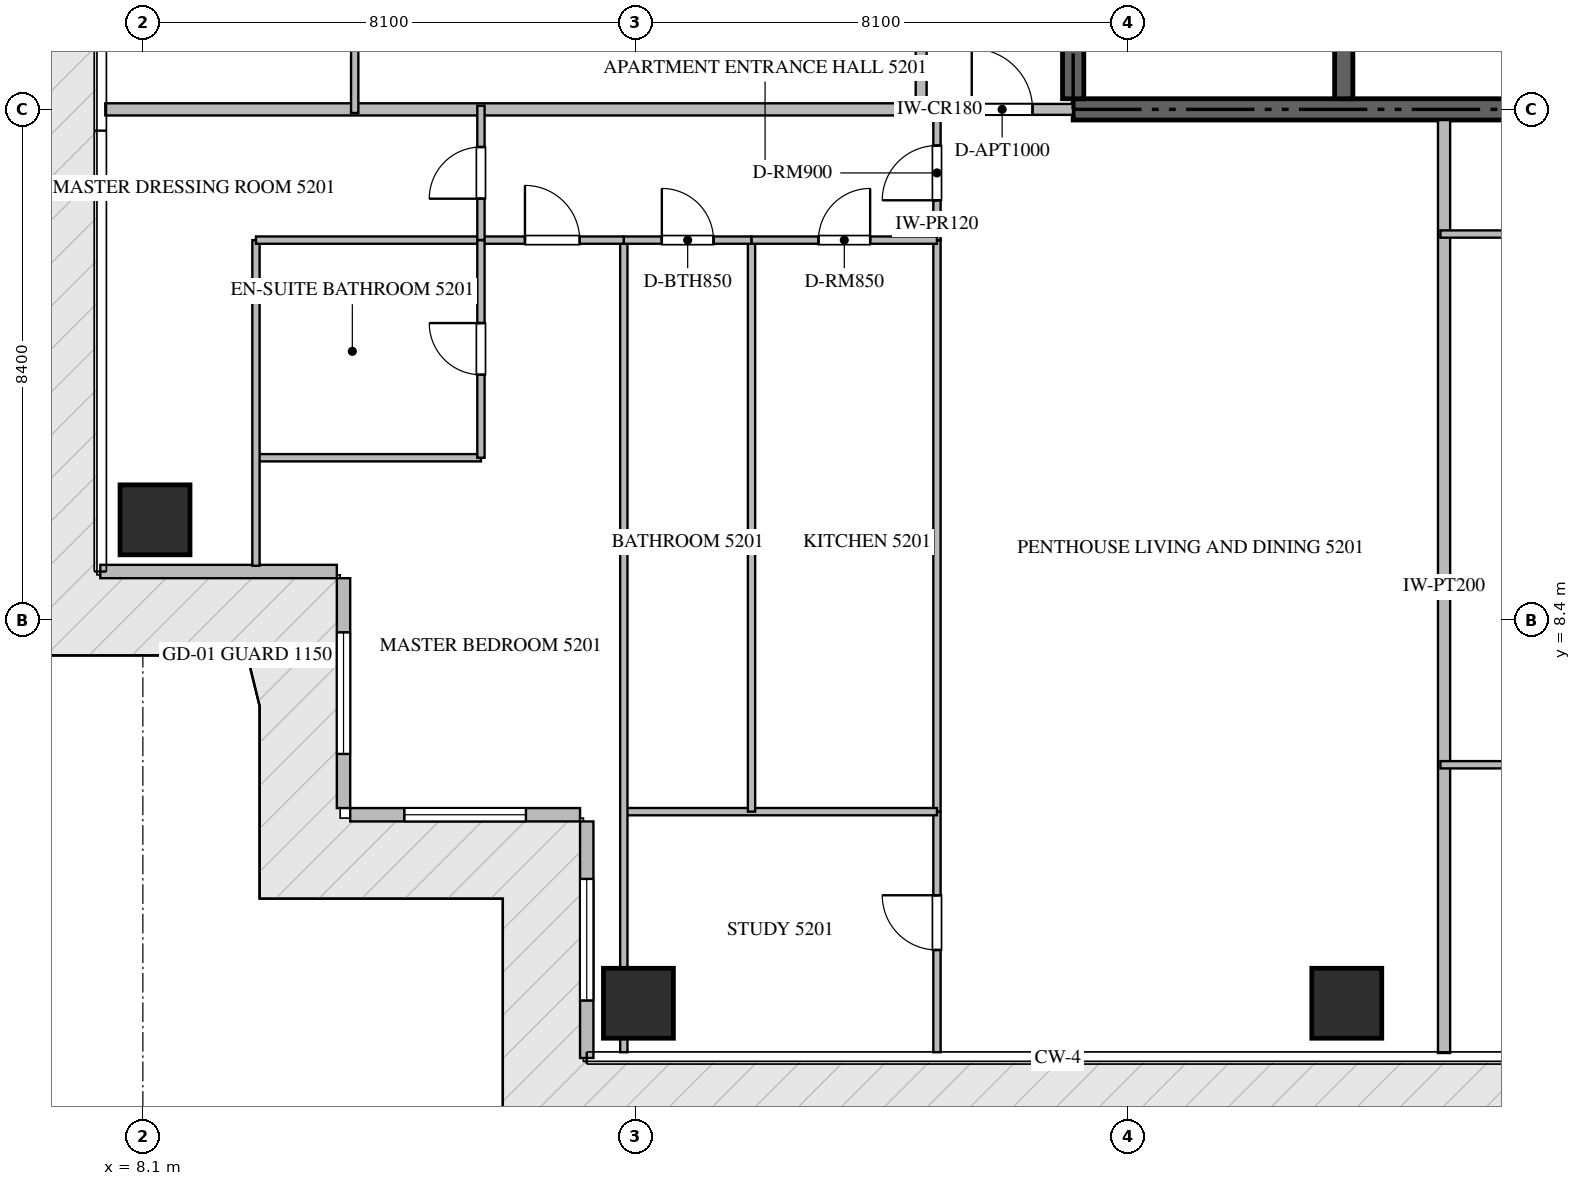
"""IFC4 building model, lengths in metres.
Left out: names, types, materials, properties, quantities, classifications, styles, units other than length and angle.
Written with IfcOpenShell. Run it as: python <this file> out.ifc"""

import sys

from ifc_helpers import new_model, si_unit, direction, frame, frame_2d, origin, origin_2d, place, context, subcontext, project, spatial, rectangle, extrude, source, transform, mapped, element, fill, save


model = new_model("IFC4")
c1 = context("Model", 3, precision=1e-05, world=origin(), true_north=direction((0.0, 1.0)))
c2 = subcontext(c1, "Body", "Model", "MODEL_VIEW")
j1 = project(units=[si_unit("LENGTHUNIT", "METRE"), si_unit("PLANEANGLEUNIT", "RADIAN")], contexts=[c1])
p1 = place(None, origin())
s1 = spatial("IfcSite", under=j1, at=p1, CompositionType="ELEMENT")
p2 = place(p1, origin())
s2 = spatial("IfcBuilding", under=s1, at=p2, CompositionType="ELEMENT")
p3 = place(p2, frame((0.0, 0.0, 210.45)))
s3 = spatial("IfcBuildingStorey", under=s2, at=p3, CompositionType="ELEMENT", Elevation=210.45)
p4 = place(p3, frame((23.4, 16.8, -0.44), z_axis=(0.0, 0.0, 1.0), x_axis=(1.0, 0.0, 0.0)))
e1 = element("IfcWall", 1, at=p4, inside=s3, PredefinedType="SHEAR", context=c2, shape_type="SweptSolid", body=[
    extrude(rectangle(XDim=18.0, YDim=0.35, at=frame_2d((9.0, 0.0))), origin(), (0.0, 0.0, 1.0), 4.028),
])
p5 = place(p3, frame((23.4, 16.975, -0.44), z_axis=(0.0, 0.0, 1.0), x_axis=(0.0, 1.0, 0.0)))
e2 = element("IfcWall", 2, at=p5, inside=s3, PredefinedType="SHEAR", context=c2, shape_type="SweptSolid", body=[
    extrude(rectangle(XDim=4.875, YDim=0.35, at=frame_2d((2.438, 0.0))), origin(), (0.0, 0.0, 1.0), 4.028),
])
p6 = place(p3, frame((27.85, 16.975, -0.44), z_axis=(0.0, 0.0, 1.0), x_axis=(0.0, 1.0, 0.0)))
e3 = element("IfcWall", 3, at=p6, inside=s3, PredefinedType="SHEAR", context=c2, shape_type="SweptSolid", body=[
    extrude(rectangle(XDim=4.875, YDim=0.3, at=frame_2d((2.438, 0.0))), origin(), (0.0, 0.0, 1.0), 4.028),
])
m1 = source(origin(), c2, "Body", "SweptSolid", [
    extrude(rectangle(XDim=1.15, YDim=1.15, at=origin_2d()), origin(), (0.0, 0.0, 1.0), 4.03),
])
for number, where, z_axis, x_axis in (
    (4, (16.25, 2.1, -0.44), (0.0, 0.0, 1.0), (1.0, 0.0, 0.0)),
    (5, (27.9, 2.1, -0.44), (0.0, 0.0, 1.0), (1.0, 0.0, 0.0)),
    (6, (8.3, 10.05, -0.44), (0.0, 0.0, 1.0), (1.0, 0.0, 0.0)),
):
    element("IfcColumn", number, at=place(p3, frame(where, z_axis=z_axis, x_axis=x_axis)), inside=s3, PredefinedType="COLUMN", context=c2, shape_type="MappedRepresentation", body=[
        mapped(m1, transform((0.0, 0.0, 0.0), scale=1.0)),
    ])
p7 = place(p3, frame((7.4, 9.2, 0.0), z_axis=(0.0, 0.0, 1.0), x_axis=(1.0, 0.0, 0.0)))
e7 = element("IfcWall", 7, at=p7, inside=s3, PredefinedType="ELEMENTEDWALL", context=c2, shape_type="SweptSolid", body=[
    extrude(rectangle(XDim=3.89, YDim=0.22, at=frame_2d((1.945, 0.0))), origin(), (0.0, 0.0, 1.0), 3.575),
])
p8 = place(p3, frame((11.4, 9.09, 0.0), z_axis=(0.0, 0.0, 1.0), x_axis=(0.0, -1.0, 0.0)))
e8 = element("IfcWall", 8, at=p8, inside=s3, PredefinedType="ELEMENTEDWALL", context=c2, shape_type="SweptSolid", body=[
    extrude(rectangle(XDim=3.78, YDim=0.22, at=frame_2d((1.89, 0.0))), origin(), (0.0, 0.0, 1.0), 3.575),
])
p9 = place(p8, frame((0.89, 0.0, 0.65)))
e9 = element("IfcOpeningElement", 9, at=p9, cuts=e8, PredefinedType="OPENING", context=c2, shape_type="SweptSolid", body=[
    extrude(rectangle(XDim=2.0, YDim=2.2, at=frame_2d((1.0, 1.1))), frame((0.0, 0.12, 0.0), z_axis=(0.0, -1.0, 0.0), x_axis=(1.0, 0.0, 0.0)), (0.0, 0.0, 1.0), 0.24),
])
p10 = place(p3, frame((11.51, 5.2, 0.0), z_axis=(0.0, 0.0, 1.0), x_axis=(1.0, 0.0, 0.0)))
e10 = element("IfcWall", 10, at=p10, inside=s3, PredefinedType="ELEMENTEDWALL", context=c2, shape_type="SweptSolid", body=[
    extrude(rectangle(XDim=3.78, YDim=0.22, at=frame_2d((1.89, 0.0))), origin(), (0.0, 0.0, 1.0), 3.575),
])
p11 = place(p10, frame((0.89, 0.0, 0.65)))
e11 = element("IfcOpeningElement", 11, at=p11, cuts=e10, PredefinedType="OPENING", context=c2, shape_type="SweptSolid", body=[
    extrude(rectangle(XDim=2.0, YDim=2.2, at=frame_2d((1.0, 1.1))), frame((0.0, 0.12, 0.0), z_axis=(0.0, -1.0, 0.0), x_axis=(1.0, 0.0, 0.0)), (0.0, 0.0, 1.0), 0.24),
])
p12 = place(p3, frame((15.4, 5.09, 0.0), z_axis=(0.0, 0.0, 1.0), x_axis=(0.0, -1.0, 0.0)))
e12 = element("IfcWall", 12, at=p12, inside=s3, PredefinedType="ELEMENTEDWALL", context=c2, shape_type="SweptSolid", body=[
    extrude(rectangle(XDim=3.89, YDim=0.22, at=frame_2d((1.945, 0.0))), origin(), (0.0, 0.0, 1.0), 3.575),
])
p13 = place(p12, frame((0.945, 0.0, 0.65)))
e13 = element("IfcOpeningElement", 13, at=p13, cuts=e12, PredefinedType="OPENING", context=c2, shape_type="SweptSolid", body=[
    extrude(rectangle(XDim=2.0, YDim=2.2, at=frame_2d((1.0, 1.1))), frame((0.0, 0.12, 0.0), z_axis=(0.0, -1.0, 0.0), x_axis=(1.0, 0.0, 0.0)), (0.0, 0.0, 1.0), 0.24),
])
p14 = place(p3, frame((29.5, 1.282, 0.0), z_axis=(0.0, 0.0, 1.0), x_axis=(0.0, 1.0, 0.0)))
e14 = element("IfcWall", 14, at=p14, inside=s3, PredefinedType="PARTITIONING", context=c2, shape_type="SweptSolid", body=[
    extrude(rectangle(XDim=15.343, YDim=0.2, at=frame_2d((7.671, 0.0))), origin(), (0.0, 0.0, 1.0), 3.59),
])
p15 = place(p3, frame((7.482, 16.8, 0.0), z_axis=(0.0, 0.0, 1.0), x_axis=(1.0, 0.0, 0.0)))
e15 = element("IfcWall", 15, at=p15, inside=s3, PredefinedType="PARTITIONING", context=c2, shape_type="SweptSolid", body=[
    extrude(rectangle(XDim=13.418, YDim=0.2, at=frame_2d((6.709, 0.0))), origin(), (0.0, 0.0, 1.0), 3.59),
])
p16 = place(p3, frame((20.902, 16.8, 0.0), z_axis=(0.0, 0.0, 1.0), x_axis=(1.0, 0.0, 0.0)))
e16 = element("IfcWall", 16, at=p16, inside=s3, PredefinedType="PARTITIONING", context=c2, shape_type="SweptSolid", body=[
    extrude(rectangle(XDim=2.496, YDim=0.18, at=frame_2d((1.248, 0.0))), origin(), (0.0, 0.0, 1.0), 3.59),
])
p17 = place(p16, frame((0.83, 0.0, 0.0)))
e17 = element("IfcOpeningElement", 17, at=p17, cuts=e16, PredefinedType="OPENING", context=c2, shape_type="SweptSolid", body=[
    extrude(rectangle(XDim=1.0, YDim=2.15, at=frame_2d((0.5, 1.075))), frame((0.0, 0.1, 0.0), z_axis=(0.0, -1.0, 0.0), x_axis=(1.0, 0.0, 0.0)), (0.0, 0.0, 1.0), 0.2),
])
p18 = place(p3, frame((20.9, 16.8, 0.0), z_axis=(0.0, 0.0, 1.0), x_axis=(0.0, 1.0, 0.0)))
e18 = element("IfcWall", 18, at=p18, inside=s3, PredefinedType="PARTITIONING", context=c2, shape_type="SweptSolid", body=[
    extrude(rectangle(XDim=16.8, YDim=0.18, at=frame_2d((8.4, 0.0))), origin(), (0.0, 0.0, 1.0), 3.59),
])
p19 = place(p18, frame((14.5, 0.0, 0.0)))
e19 = element("IfcOpeningElement", 19, at=p19, cuts=e18, PredefinedType="OPENING", context=c2, shape_type="SweptSolid", body=[
    extrude(rectangle(XDim=1.0, YDim=2.15, at=frame_2d((0.5, 1.075))), frame((0.0, 0.1, 0.0), z_axis=(0.0, -1.0, 0.0), x_axis=(1.0, 0.0, 0.0)), (0.0, 0.0, 1.0), 0.2),
])
p20 = place(p3, frame((21.16, 14.65, 0.0), z_axis=(0.0, 0.0, 1.0), x_axis=(0.0, 1.0, 0.0)))
e20 = element("IfcWall", 20, at=p20, inside=s3, PredefinedType="PARTITIONING", context=c2, shape_type="SweptSolid", body=[
    extrude(rectangle(XDim=2.21, YDim=0.12, at=frame_2d((1.105, 0.0))), origin(), (0.0, 0.0, 1.0), 3.59),
])
p21 = place(p20, frame((0.655, 0.0, 0.0)))
e21 = element("IfcOpeningElement", 21, at=p21, cuts=e20, PredefinedType="OPENING", context=c2, shape_type="SweptSolid", body=[
    extrude(rectangle(XDim=0.9, YDim=2.1, at=frame_2d((0.45, 1.05))), frame((0.0, 0.07, 0.0), z_axis=(0.0, -1.0, 0.0), x_axis=(1.0, 0.0, 0.0)), (0.0, 0.0, 1.0), 0.14),
])
p22 = place(p3, frame((21.16, 1.295, 0.0), z_axis=(0.0, 0.0, 1.0), x_axis=(0.0, 1.0, 0.0)))
e22 = element("IfcWall", 22, at=p22, inside=s3, PredefinedType="PARTITIONING", context=c2, shape_type="SweptSolid", body=[
    extrude(rectangle(XDim=3.956, YDim=0.12, at=frame_2d((1.978, 0.0))), origin(), (0.0, 0.0, 1.0), 3.59),
])
p23 = place(p22, frame((1.681, 0.0, 0.0)))
e23 = element("IfcOpeningElement", 23, at=p23, cuts=e22, PredefinedType="OPENING", context=c2, shape_type="SweptSolid", body=[
    extrude(rectangle(XDim=0.9, YDim=2.1, at=frame_2d((0.45, 1.05))), frame((0.0, 0.07, 0.0), z_axis=(0.0, -1.0, 0.0), x_axis=(1.0, 0.0, 0.0)), (0.0, 0.0, 1.0), 0.14),
])
p24 = place(p3, frame((21.16, 5.253, 0.0), z_axis=(0.0, 0.0, 1.0), x_axis=(0.0, 1.0, 0.0)))
e24 = element("IfcWall", 24, at=p24, inside=s3, PredefinedType="PARTITIONING", context=c2, shape_type="SweptSolid", body=[
    extrude(rectangle(XDim=9.395, YDim=0.12, at=frame_2d((4.698, 0.0))), origin(), (0.0, 0.0, 1.0), 3.59),
])
p25 = place(p3, frame((16.01, 5.251, 0.0), z_axis=(0.0, 0.0, 1.0), x_axis=(1.0, 0.0, 0.0)))
e25 = element("IfcWall", 25, at=p25, inside=s3, PredefinedType="PARTITIONING", context=c2, shape_type="SweptSolid", body=[
    extrude(rectangle(XDim=5.15, YDim=0.12, at=frame_2d((2.575, 0.0))), origin(), (0.0, 0.0, 1.0), 3.59),
])
p26 = place(p3, frame((16.01, 1.295, 0.0), z_axis=(0.0, 0.0, 1.0), x_axis=(0.0, 1.0, 0.0)))
e26 = element("IfcWall", 26, at=p26, inside=s3, PredefinedType="PARTITIONING", context=c2, shape_type="SweptSolid", body=[
    extrude(rectangle(XDim=13.355, YDim=0.12, at=frame_2d((6.677, 0.0))), origin(), (0.0, 0.0, 1.0), 3.122),
])
p27 = place(p3, frame((18.11, 5.251, 0.0), z_axis=(0.0, 0.0, 1.0), x_axis=(0.0, 1.0, 0.0)))
e27 = element("IfcWall", 27, at=p27, inside=s3, PredefinedType="PARTITIONING", context=c2, shape_type="SweptSolid", body=[
    extrude(rectangle(XDim=9.399, YDim=0.12, at=frame_2d((4.699, 0.0))), origin(), (0.0, 0.0, 1.0), 3.59),
])
p28 = place(p3, frame((16.01, 14.65, 0.0), z_axis=(0.0, 0.0, 1.0), x_axis=(1.0, 0.0, 0.0)))
e28 = element("IfcWall", 28, at=p28, inside=s3, PredefinedType="PARTITIONING", context=c2, shape_type="SweptSolid", body=[
    extrude(rectangle(XDim=2.1, YDim=0.12, at=frame_2d((1.05, 0.0))), origin(), (0.0, 0.0, 1.0), 3.59),
])
p29 = place(p28, frame((0.625, 0.0, 0.0)))
e29 = element("IfcOpeningElement", 29, at=p29, cuts=e28, PredefinedType="OPENING", context=c2, shape_type="SweptSolid", body=[
    extrude(rectangle(XDim=0.85, YDim=2.1, at=frame_2d((0.425, 1.05))), frame((0.0, 0.07, 0.0), z_axis=(0.0, -1.0, 0.0), x_axis=(1.0, 0.0, 0.0)), (0.0, 0.0, 1.0), 0.14),
])
p30 = place(p3, frame((18.112, 14.65, 0.0), z_axis=(0.0, 0.0, 1.0), x_axis=(1.0, 0.0, 0.0)))
e30 = element("IfcWall", 30, at=p30, inside=s3, PredefinedType="PARTITIONING", context=c2, shape_type="SweptSolid", body=[
    extrude(rectangle(XDim=3.048, YDim=0.12, at=frame_2d((1.524, 0.0))), origin(), (0.0, 0.0, 1.0), 3.59),
])
p31 = place(p30, frame((1.099, 0.0, 0.0)))
e31 = element("IfcOpeningElement", 31, at=p31, cuts=e30, PredefinedType="OPENING", context=c2, shape_type="SweptSolid", body=[
    extrude(rectangle(XDim=0.85, YDim=2.1, at=frame_2d((0.425, 1.05))), frame((0.0, 0.07, 0.0), z_axis=(0.0, -1.0, 0.0), x_axis=(1.0, 0.0, 0.0)), (0.0, 0.0, 1.0), 0.14),
])
p32 = place(p3, frame((13.66, 14.65, 0.0), z_axis=(0.0, 0.0, 1.0), x_axis=(1.0, 0.0, 0.0)))
e32 = element("IfcWall", 32, at=p32, inside=s3, PredefinedType="PARTITIONING", context=c2, shape_type="SweptSolid", body=[
    extrude(rectangle(XDim=2.348, YDim=0.12, at=frame_2d((1.174, 0.0))), origin(), (0.0, 0.0, 1.0), 3.59),
])
p33 = place(p32, frame((0.724, 0.0, 0.0)))
e33 = element("IfcOpeningElement", 33, at=p33, cuts=e32, PredefinedType="OPENING", context=c2, shape_type="SweptSolid", body=[
    extrude(rectangle(XDim=0.9, YDim=2.1, at=frame_2d((0.45, 1.05))), frame((0.0, 0.07, 0.0), z_axis=(0.0, -1.0, 0.0), x_axis=(1.0, 0.0, 0.0)), (0.0, 0.0, 1.0), 0.14),
])
p34 = place(p3, frame((9.96, 11.071, 0.0), z_axis=(0.0, 0.0, 1.0), x_axis=(1.0, 0.0, 0.0)))
e34 = element("IfcWall", 34, at=p34, inside=s3, PredefinedType="PARTITIONING", context=c2, shape_type="SweptSolid", body=[
    extrude(rectangle(XDim=3.7, YDim=0.12, at=frame_2d((1.85, 0.0))), origin(), (0.0, 0.0, 1.0), 3.59),
])
p35 = place(p3, frame((9.96, 9.295, 0.0), z_axis=(0.0, 0.0, 1.0), x_axis=(0.0, 1.0, 0.0)))
e35 = element("IfcWall", 35, at=p35, inside=s3, PredefinedType="PARTITIONING", context=c2, shape_type="SweptSolid", body=[
    extrude(rectangle(XDim=5.355, YDim=0.12, at=frame_2d((2.677, 0.0))), origin(), (0.0, 0.0, 1.0), 3.59),
])
p36 = place(p3, frame((9.96, 14.65, 0.0), z_axis=(0.0, 0.0, 1.0), x_axis=(1.0, 0.0, 0.0)))
e36 = element("IfcWall", 36, at=p36, inside=s3, PredefinedType="PARTITIONING", context=c2, shape_type="SweptSolid", body=[
    extrude(rectangle(XDim=3.698, YDim=0.12, at=frame_2d((1.849, 0.0))), origin(), (0.0, 0.0, 1.0), 3.59),
])
p37 = place(p3, frame((13.66, 11.071, 0.0), z_axis=(0.0, 0.0, 1.0), x_axis=(0.0, 1.0, 0.0)))
e37 = element("IfcWall", 37, at=p37, inside=s3, PredefinedType="PARTITIONING", context=c2, shape_type="SweptSolid", body=[
    extrude(rectangle(XDim=3.579, YDim=0.12, at=frame_2d((1.79, 0.0))), origin(), (0.0, 0.0, 1.0), 3.59),
])
p38 = place(p37, frame((1.365, 0.0, 0.0)))
e38 = element("IfcOpeningElement", 38, at=p38, cuts=e37, PredefinedType="OPENING", context=c2, shape_type="SweptSolid", body=[
    extrude(rectangle(XDim=0.85, YDim=2.1, at=frame_2d((0.425, 1.05))), frame((0.0, 0.07, 0.0), z_axis=(0.0, -1.0, 0.0), x_axis=(1.0, 0.0, 0.0)), (0.0, 0.0, 1.0), 0.14),
])
p39 = place(p3, frame((13.66, 14.652, 0.0), z_axis=(0.0, 0.0, 1.0), x_axis=(0.0, 1.0, 0.0)))
e39 = element("IfcWall", 39, at=p39, inside=s3, PredefinedType="PARTITIONING", context=c2, shape_type="SweptSolid", body=[
    extrude(rectangle(XDim=2.208, YDim=0.12, at=frame_2d((1.104, 0.0))), origin(), (0.0, 0.0, 1.0), 3.59),
])
p40 = place(p39, frame((0.679, 0.0, 0.0)))
e40 = element("IfcOpeningElement", 40, at=p40, cuts=e39, PredefinedType="OPENING", context=c2, shape_type="SweptSolid", body=[
    extrude(rectangle(XDim=0.85, YDim=2.1, at=frame_2d((0.425, 1.05))), frame((0.0, 0.07, 0.0), z_axis=(0.0, -1.0, 0.0), x_axis=(1.0, 0.0, 0.0)), (0.0, 0.0, 1.0), 0.14),
])
for number, where, z_axis, x_axis in (
    (41, (29.44, 6.022, 0.0), (0.0, 0.0, 1.0), (1.0, 0.0, 0.0)),
    (42, (29.44, 14.75, 0.0), (0.0, 0.0, 1.0), (1.0, 0.0, 0.0)),
):
    element("IfcWall", number, at=place(p3, frame(where, z_axis=z_axis, x_axis=x_axis)), inside=s3, PredefinedType="PARTITIONING", context=c2, shape_type="SweptSolid", body=[
        extrude(rectangle(XDim=9.06, YDim=0.12, at=frame_2d((4.53, 0.0))), origin(), (0.0, 0.0, 1.0), 3.59),
    ])
p41 = place(p3, frame((11.584, 16.74, 0.0), z_axis=(0.0, 0.0, 1.0), x_axis=(0.0, 1.0, 0.0)))
e43 = element("IfcWall", 43, at=p41, inside=s3, PredefinedType="PARTITIONING", context=c2, shape_type="SweptSolid", body=[
    extrude(rectangle(XDim=10.48, YDim=0.12, at=frame_2d((5.24, 0.0))), origin(), (0.0, 0.0, 1.0), 3.59),
])
m2 = source(origin(), c2, "Body", "SweptSolid", [
    extrude(rectangle(XDim=2.0, YDim=2.2, at=frame_2d((1.0, 1.1))), frame((0.0, 0.03, 0.0), z_axis=(0.0, -1.0, 0.0), x_axis=(1.0, 0.0, 0.0)), (0.0, 0.0, 1.0), 0.06),
])
p42 = place(p9, origin())
e44 = element("IfcWindow", 44, at=p42, inside=s3, PartitioningType="SINGLE_PANEL", PredefinedType="WINDOW", context=c2, shape_type="MappedRepresentation", body=[
    mapped(m2, transform((0.0, 0.0, 0.0), scale=1.0)),
])
fill(e9, e44)
p43 = place(p11, origin())
e45 = element("IfcWindow", 45, at=p43, inside=s3, PartitioningType="SINGLE_PANEL", PredefinedType="WINDOW", context=c2, shape_type="MappedRepresentation", body=[
    mapped(m2, transform((0.0, 0.0, 0.0), scale=1.0)),
])
fill(e11, e45)
p44 = place(p13, origin())
e46 = element("IfcWindow", 46, at=p44, inside=s3, PartitioningType="SINGLE_PANEL", PredefinedType="WINDOW", context=c2, shape_type="MappedRepresentation", body=[
    mapped(m2, transform((0.0, 0.0, 0.0), scale=1.0)),
])
fill(e13, e46)
m3 = source(origin(), c2, "Body", "SweptSolid", [
    extrude(rectangle(XDim=1.0, YDim=2.15, at=frame_2d((0.5, 1.075))), frame((0.0, 0.025, 0.0), z_axis=(0.0, -1.0, 0.0), x_axis=(1.0, 0.0, 0.0)), (0.0, 0.0, 1.0), 0.05),
])
p45 = place(p17, origin())
e47 = element("IfcDoor", 47, at=p45, inside=s3, OperationType="SINGLE_SWING_LEFT", PredefinedType="DOOR", context=c2, shape_type="MappedRepresentation", body=[
    mapped(m3, transform((0.0, 0.0, 0.0), scale=1.0)),
])
fill(e17, e47)
m4 = source(origin(), c2, "Body", "SweptSolid", [
    extrude(rectangle(XDim=0.9, YDim=2.1, at=frame_2d((0.45, 1.05))), frame((0.0, 0.025, 0.0), z_axis=(0.0, -1.0, 0.0), x_axis=(1.0, 0.0, 0.0)), (0.0, 0.0, 1.0), 0.05),
])
p46 = place(p21, origin())
e48 = element("IfcDoor", 48, at=p46, inside=s3, OperationType="SINGLE_SWING_LEFT", PredefinedType="DOOR", context=c2, shape_type="MappedRepresentation", body=[
    mapped(m4, transform((0.0, 0.0, 0.0), scale=1.0)),
])
fill(e21, e48)
p47 = place(p23, origin())
e49 = element("IfcDoor", 49, at=p47, inside=s3, OperationType="SINGLE_SWING_RIGHT", PredefinedType="DOOR", context=c2, shape_type="MappedRepresentation", body=[
    mapped(m4, transform((0.0, 0.0, 0.0), scale=1.0)),
])
fill(e23, e49)
m5 = source(origin(), c2, "Body", "SweptSolid", [
    extrude(rectangle(XDim=0.85, YDim=2.1, at=frame_2d((0.425, 1.05))), frame((0.0, 0.025, 0.0), z_axis=(0.0, -1.0, 0.0), x_axis=(1.0, 0.0, 0.0)), (0.0, 0.0, 1.0), 0.05),
])
p48 = place(p29, origin())
e50 = element("IfcDoor", 50, at=p48, inside=s3, OperationType="SINGLE_SWING_LEFT", PredefinedType="DOOR", context=c2, shape_type="MappedRepresentation", body=[
    mapped(m5, transform((0.0, 0.0, 0.0), scale=1.0)),
])
fill(e29, e50)
p49 = place(p31, origin())
e51 = element("IfcDoor", 51, at=p49, inside=s3, OperationType="SINGLE_SWING_RIGHT", PredefinedType="DOOR", context=c2, shape_type="MappedRepresentation", body=[
    mapped(m5, transform((0.0, 0.0, 0.0), scale=1.0)),
])
fill(e31, e51)
p50 = place(p33, origin())
e52 = element("IfcDoor", 52, at=p50, inside=s3, OperationType="SINGLE_SWING_LEFT", PredefinedType="DOOR", context=c2, shape_type="MappedRepresentation", body=[
    mapped(m4, transform((0.0, 0.0, 0.0), scale=1.0)),
])
fill(e33, e52)
p51 = place(p38, origin())
e53 = element("IfcDoor", 53, at=p51, inside=s3, OperationType="SINGLE_SWING_RIGHT", PredefinedType="DOOR", context=c2, shape_type="MappedRepresentation", body=[
    mapped(m5, transform((0.0, 0.0, 0.0), scale=1.0)),
])
fill(e38, e53)
p52 = place(p40, origin())
e54 = element("IfcDoor", 54, at=p52, inside=s3, OperationType="SINGLE_SWING_LEFT", PredefinedType="DOOR", context=c2, shape_type="MappedRepresentation", body=[
    mapped(m5, transform((0.0, 0.0, 0.0), scale=1.0)),
])
fill(e40, e54)
save(model, sys.argv[1])
